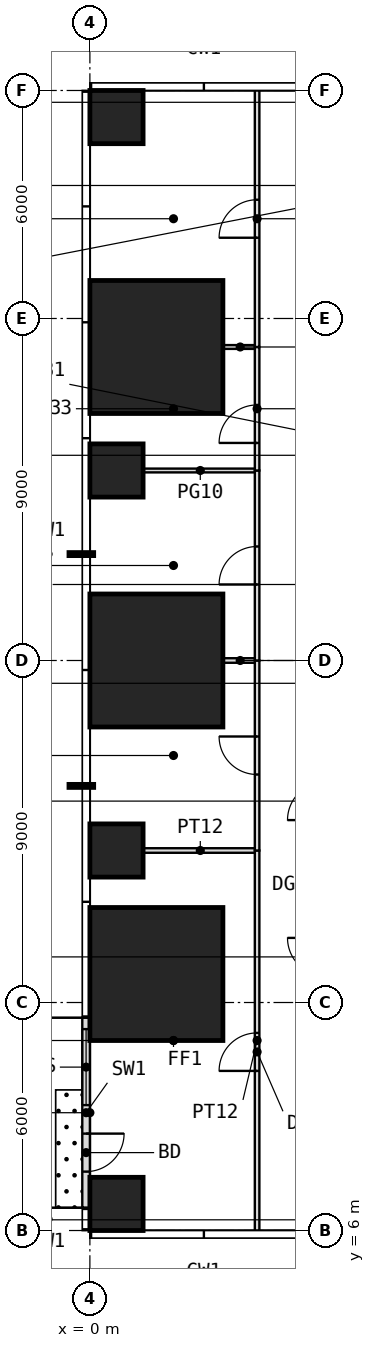
"""IFC4 building model, lengths in metres.
Left out: names, types, materials, properties, quantities, classifications, styles, units other than length and angle.
Written with IfcOpenShell. Run it as: python <this file> out.ifc"""

import sys

from ifc_helpers import new_model, si_unit, direction, frame, frame_2d, origin, origin_2d, place, context, subcontext, project, spatial, rectangle, extrude, element, fill, save


model = new_model("IFC4")
c1 = context("Model", 3, precision=1e-05, world=origin(), true_north=direction((0.0, 1.0)))
c2 = subcontext(c1, "Body", "Model", "MODEL_VIEW")
j1 = project(units=[si_unit("LENGTHUNIT", "METRE"), si_unit("PLANEANGLEUNIT", "RADIAN")], contexts=[c1])
p1 = place(None, origin())
s1 = spatial("IfcSite", under=j1, at=p1, CompositionType="ELEMENT")
p2 = place(p1, origin())
s2 = spatial("IfcBuilding", under=s1, at=p2, CompositionType="ELEMENT")
p3 = place(p2, frame((0.0, 0.0, 78.5)))
s3 = spatial("IfcBuildingStorey", under=s2, at=p3, CompositionType="ELEMENT", Elevation=78.5)
p4 = place(p3, frame((0.7, 6.7, 0.0), z_axis=(0.0, 0.0, 1.0), x_axis=(1.0, 0.0, 0.0)))
e1 = element("IfcColumn", 1, at=p4, inside=s3, PredefinedType="COLUMN", context=c2, shape_type="SweptSolid", body=[
    extrude(rectangle(XDim=1.4, YDim=1.4, at=origin_2d()), origin(), (0.0, 0.0, 1.0), 4.0),
])
p5 = place(p3, frame((1.75, 12.75, 0.0), z_axis=(0.0, 0.0, 1.0), x_axis=(1.0, 0.0, 0.0)))
e2 = element("IfcColumn", 2, at=p5, inside=s3, PredefinedType="COLUMN", context=c2, shape_type="SweptSolid", body=[
    extrude(rectangle(XDim=3.5, YDim=3.5, at=origin_2d()), origin(), (0.0, 0.0, 1.0), 4.0),
])
p6 = place(p3, frame((0.7, 16.0, 0.0), z_axis=(0.0, 0.0, 1.0), x_axis=(1.0, 0.0, 0.0)))
e3 = element("IfcColumn", 3, at=p6, inside=s3, PredefinedType="COLUMN", context=c2, shape_type="SweptSolid", body=[
    extrude(rectangle(XDim=1.4, YDim=1.4, at=origin_2d()), origin(), (0.0, 0.0, 1.0), 4.0),
])
p7 = place(p3, frame((1.75, 21.0, 0.0), z_axis=(0.0, 0.0, 1.0), x_axis=(1.0, 0.0, 0.0)))
e4 = element("IfcColumn", 4, at=p7, inside=s3, PredefinedType="COLUMN", context=c2, shape_type="SweptSolid", body=[
    extrude(rectangle(XDim=3.5, YDim=3.5, at=origin_2d()), origin(), (0.0, 0.0, 1.0), 4.0),
])
p8 = place(p3, frame((0.7, 26.0, 0.0), z_axis=(0.0, 0.0, 1.0), x_axis=(1.0, 0.0, 0.0)))
e5 = element("IfcColumn", 5, at=p8, inside=s3, PredefinedType="COLUMN", context=c2, shape_type="SweptSolid", body=[
    extrude(rectangle(XDim=1.4, YDim=1.4, at=origin_2d()), origin(), (0.0, 0.0, 1.0), 4.0),
])
p9 = place(p3, frame((1.75, 29.25, 0.0), z_axis=(0.0, 0.0, 1.0), x_axis=(1.0, 0.0, 0.0)))
e6 = element("IfcColumn", 6, at=p9, inside=s3, PredefinedType="COLUMN", context=c2, shape_type="SweptSolid", body=[
    extrude(rectangle(XDim=3.5, YDim=3.5, at=origin_2d()), origin(), (0.0, 0.0, 1.0), 4.0),
])
p10 = place(p3, frame((0.7, 35.3, 0.0), z_axis=(0.0, 0.0, 1.0), x_axis=(1.0, 0.0, 0.0)))
e7 = element("IfcColumn", 7, at=p10, inside=s3, PredefinedType="COLUMN", context=c2, shape_type="SweptSolid", body=[
    extrude(rectangle(XDim=1.4, YDim=1.4, at=origin_2d()), origin(), (0.0, 0.0, 1.0), 4.0),
])
p11 = place(p3, frame((-0.1, 11.6, 0.0), z_axis=(0.0, 0.0, 1.0), x_axis=(0.0, -1.0, 0.0)))
e8 = element("IfcWall", 8, at=p11, inside=s3, PredefinedType="USERDEFINED", context=c2, shape_type="SweptSolid", body=[
    extrude(rectangle(XDim=5.0, YDim=0.2, at=frame_2d((2.5, 0.0))), origin(), (0.0, 0.0, 1.0), 3.75),
])
p12 = place(p11, frame((3.05, 0.0, 0.0)))
e9 = element("IfcOpeningElement", 9, at=p12, cuts=e8, PredefinedType="OPENING", context=c2, shape_type="SweptSolid", body=[
    extrude(rectangle(XDim=1.0, YDim=2.4, at=frame_2d((0.5, 1.2))), frame((0.0, 0.11, 0.0), z_axis=(0.0, -1.0, 0.0), x_axis=(1.0, 0.0, 0.0)), (0.0, 0.0, 1.0), 0.22),
])
p13 = place(p11, frame((0.3, 0.0, 0.3)))
e10 = element("IfcOpeningElement", 10, at=p13, cuts=e8, PredefinedType="OPENING", context=c2, shape_type="SweptSolid", body=[
    extrude(rectangle(XDim=2.0, YDim=2.7, at=frame_2d((1.0, 1.35))), frame((0.0, 0.11, 0.0), z_axis=(0.0, -1.0, 0.0), x_axis=(1.0, 0.0, 0.0)), (0.0, 0.0, 1.0), 0.22),
])
p14 = place(p3, frame((1.41, 16.0, 0.0), z_axis=(0.0, 0.0, 1.0), x_axis=(1.0, 0.0, 0.0)))
e11 = element("IfcWall", 11, at=p14, inside=s3, PredefinedType="PARTITIONING", context=c2, shape_type="SweptSolid", body=[
    extrude(rectangle(XDim=2.99, YDim=0.12, at=frame_2d((1.495, 0.0))), origin(), (0.0, 0.0, 1.0), 3.75),
])
p15 = place(p3, frame((1.41, 26.0, 0.0), z_axis=(0.0, 0.0, 1.0), x_axis=(1.0, 0.0, 0.0)))
e12 = element("IfcWall", 12, at=p15, inside=s3, PredefinedType="PARTITIONING", context=c2, shape_type="SweptSolid", body=[
    extrude(rectangle(XDim=2.99, YDim=0.1, at=frame_2d((1.495, 0.0))), origin(), (0.0, 0.0, 1.0), 3.75),
])
p16 = place(p3, frame((3.51, 21.0, 0.0), z_axis=(0.0, 0.0, 1.0), x_axis=(1.0, 0.0, 0.0)))
e13 = element("IfcWall", 13, at=p16, inside=s3, PredefinedType="PARTITIONING", context=c2, shape_type="SweptSolid", body=[
    extrude(rectangle(XDim=0.89, YDim=0.12, at=frame_2d((0.445, 0.0))), origin(), (0.0, 0.0, 1.0), 3.75),
])
p17 = place(p3, frame((3.51, 29.25, 0.0), z_axis=(0.0, 0.0, 1.0), x_axis=(1.0, 0.0, 0.0)))
e14 = element("IfcWall", 14, at=p17, inside=s3, PredefinedType="PARTITIONING", context=c2, shape_type="SweptSolid", body=[
    extrude(rectangle(XDim=0.89, YDim=0.1, at=frame_2d((0.445, 0.0))), origin(), (0.0, 0.0, 1.0), 3.75),
])
p18 = place(p3, frame((4.4, 6.0, 0.0), z_axis=(0.0, 0.0, 1.0), x_axis=(0.0, 1.0, 0.0)))
e15 = element("IfcWall", 15, at=p18, inside=s3, PredefinedType="PARTITIONING", context=c2, shape_type="SweptSolid", body=[
    extrude(rectangle(XDim=10.0, YDim=0.12, at=frame_2d((5.0, 0.0))), origin(), (0.0, 0.0, 1.0), 3.75),
])
p19 = place(p18, frame((4.2, 0.0, 0.0)))
e16 = element("IfcOpeningElement", 16, at=p19, cuts=e15, PredefinedType="OPENING", context=c2, shape_type="SweptSolid", body=[
    extrude(rectangle(XDim=1.0, YDim=2.4, at=frame_2d((0.5, 1.2))), frame((0.0, 0.07, 0.0), z_axis=(0.0, -1.0, 0.0), x_axis=(1.0, 0.0, 0.0)), (0.0, 0.0, 1.0), 0.14),
])
p20 = place(p3, frame((4.4, 16.0, 0.0), z_axis=(0.0, 0.0, 1.0), x_axis=(0.0, 1.0, 0.0)))
e17 = element("IfcWall", 17, at=p20, inside=s3, PredefinedType="PARTITIONING", context=c2, shape_type="SweptSolid", body=[
    extrude(rectangle(XDim=5.0, YDim=0.12, at=frame_2d((2.5, 0.0))), origin(), (0.0, 0.0, 1.0), 3.75),
])
p21 = place(p20, frame((2.0, 0.0, 0.0)))
e18 = element("IfcOpeningElement", 18, at=p21, cuts=e17, PredefinedType="OPENING", context=c2, shape_type="SweptSolid", body=[
    extrude(rectangle(XDim=1.0, YDim=2.2, at=frame_2d((0.5, 1.1))), frame((0.0, 0.07, 0.0), z_axis=(0.0, -1.0, 0.0), x_axis=(1.0, 0.0, 0.0)), (0.0, 0.0, 1.0), 0.14),
])
p22 = place(p3, frame((4.4, 21.0, 0.0), z_axis=(0.0, 0.0, 1.0), x_axis=(0.0, 1.0, 0.0)))
e19 = element("IfcWall", 19, at=p22, inside=s3, PredefinedType="PARTITIONING", context=c2, shape_type="SweptSolid", body=[
    extrude(rectangle(XDim=5.0, YDim=0.12, at=frame_2d((2.5, 0.0))), origin(), (0.0, 0.0, 1.0), 3.75),
])
p23 = place(p22, frame((2.0, 0.0, 0.0)))
e20 = element("IfcOpeningElement", 20, at=p23, cuts=e19, PredefinedType="OPENING", context=c2, shape_type="SweptSolid", body=[
    extrude(rectangle(XDim=1.0, YDim=2.4, at=frame_2d((0.5, 1.2))), frame((0.0, 0.07, 0.0), z_axis=(0.0, -1.0, 0.0), x_axis=(1.0, 0.0, 0.0)), (0.0, 0.0, 1.0), 0.14),
])
p24 = place(p3, frame((4.4, 26.0, 0.0), z_axis=(0.0, 0.0, 1.0), x_axis=(0.0, 1.0, 0.0)))
e21 = element("IfcWall", 21, at=p24, inside=s3, PredefinedType="PARTITIONING", context=c2, shape_type="SweptSolid", body=[
    extrude(rectangle(XDim=3.25, YDim=0.12, at=frame_2d((1.625, 0.0))), origin(), (0.0, 0.0, 1.0), 3.75),
])
p25 = place(p24, frame((0.725, 0.0, 0.0)))
e22 = element("IfcOpeningElement", 22, at=p25, cuts=e21, PredefinedType="OPENING", context=c2, shape_type="SweptSolid", body=[
    extrude(rectangle(XDim=1.0, YDim=2.4, at=frame_2d((0.5, 1.2))), frame((0.0, 0.07, 0.0), z_axis=(0.0, -1.0, 0.0), x_axis=(1.0, 0.0, 0.0)), (0.0, 0.0, 1.0), 0.14),
])
p26 = place(p3, frame((4.4, 29.25, 0.0), z_axis=(0.0, 0.0, 1.0), x_axis=(0.0, 1.0, 0.0)))
e23 = element("IfcWall", 23, at=p26, inside=s3, PredefinedType="PARTITIONING", context=c2, shape_type="SweptSolid", body=[
    extrude(rectangle(XDim=6.75, YDim=0.12, at=frame_2d((3.375, 0.0))), origin(), (0.0, 0.0, 1.0), 3.75),
])
p27 = place(p26, frame((2.875, 0.0, 0.0)))
e24 = element("IfcOpeningElement", 24, at=p27, cuts=e23, PredefinedType="OPENING", context=c2, shape_type="SweptSolid", body=[
    extrude(rectangle(XDim=1.0, YDim=2.4, at=frame_2d((0.5, 1.2))), frame((0.0, 0.07, 0.0), z_axis=(0.0, -1.0, 0.0), x_axis=(1.0, 0.0, 0.0)), (0.0, 0.0, 1.0), 0.14),
])
p28 = place(p12, origin())
e25 = element("IfcDoor", 25, at=p28, inside=s3, OperationType="SINGLE_SWING_LEFT", PredefinedType="DOOR", context=c2, shape_type="SweptSolid", body=[
    extrude(rectangle(XDim=1.0, YDim=2.4, at=frame_2d((0.5, 1.2))), frame((0.0, 0.025, 0.0), z_axis=(0.0, -1.0, 0.0), x_axis=(1.0, 0.0, 0.0)), (0.0, 0.0, 1.0), 0.05),
])
fill(e9, e25)
p29 = place(p13, origin())
e26 = element("IfcWindow", 26, at=p29, inside=s3, PartitioningType="SINGLE_PANEL", PredefinedType="WINDOW", context=c2, shape_type="SweptSolid", body=[
    extrude(rectangle(XDim=2.0, YDim=2.7, at=frame_2d((1.0, 1.35))), frame((0.0, 0.03, 0.0), z_axis=(0.0, -1.0, 0.0), x_axis=(1.0, 0.0, 0.0)), (0.0, 0.0, 1.0), 0.06),
])
fill(e10, e26)
p30 = place(p21, origin())
e27 = element("IfcDoor", 27, at=p30, inside=s3, OperationType="SINGLE_SWING_RIGHT", PredefinedType="DOOR", context=c2, shape_type="SweptSolid", body=[
    extrude(rectangle(XDim=1.0, YDim=2.2, at=frame_2d((0.5, 1.1))), frame((0.0, 0.025, 0.0), z_axis=(0.0, -1.0, 0.0), x_axis=(1.0, 0.0, 0.0)), (0.0, 0.0, 1.0), 0.05),
])
fill(e18, e27)
p31 = place(p25, origin())
e28 = element("IfcDoor", 28, at=p31, inside=s3, OperationType="SINGLE_SWING_LEFT", PredefinedType="DOOR", context=c2, shape_type="SweptSolid", body=[
    extrude(rectangle(XDim=1.0, YDim=2.4, at=frame_2d((0.5, 1.2))), frame((0.0, 0.025, 0.0), z_axis=(0.0, -1.0, 0.0), x_axis=(1.0, 0.0, 0.0)), (0.0, 0.0, 1.0), 0.05),
])
fill(e22, e28)
p32 = place(p19, origin())
e29 = element("IfcDoor", 29, at=p32, inside=s3, OperationType="SINGLE_SWING_LEFT", PredefinedType="DOOR", context=c2, shape_type="SweptSolid", body=[
    extrude(rectangle(XDim=1.0, YDim=2.4, at=frame_2d((0.5, 1.2))), frame((0.0, 0.025, 0.0), z_axis=(0.0, -1.0, 0.0), x_axis=(1.0, 0.0, 0.0)), (0.0, 0.0, 1.0), 0.05),
])
fill(e16, e29)
p33 = place(p23, origin())
e30 = element("IfcDoor", 30, at=p33, inside=s3, OperationType="SINGLE_SWING_LEFT", PredefinedType="DOOR", context=c2, shape_type="SweptSolid", body=[
    extrude(rectangle(XDim=1.0, YDim=2.4, at=frame_2d((0.5, 1.2))), frame((0.0, 0.025, 0.0), z_axis=(0.0, -1.0, 0.0), x_axis=(1.0, 0.0, 0.0)), (0.0, 0.0, 1.0), 0.05),
])
fill(e20, e30)
p34 = place(p27, origin())
e31 = element("IfcDoor", 31, at=p34, inside=s3, OperationType="SINGLE_SWING_LEFT", PredefinedType="DOOR", context=c2, shape_type="SweptSolid", body=[
    extrude(rectangle(XDim=1.0, YDim=2.4, at=frame_2d((0.5, 1.2))), frame((0.0, 0.025, 0.0), z_axis=(0.0, -1.0, 0.0), x_axis=(1.0, 0.0, 0.0)), (0.0, 0.0, 1.0), 0.05),
])
fill(e24, e31)
save(model, sys.argv[1])
